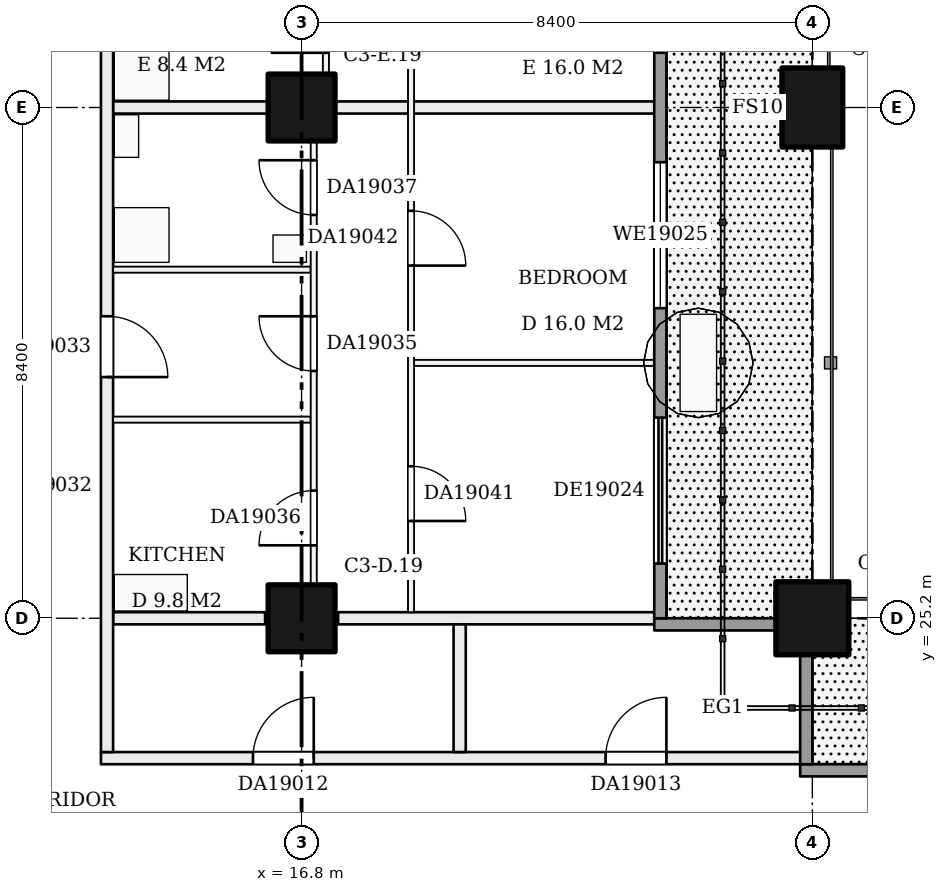
"""IFC4 building model, lengths in metres.
Left out: names, types, materials, properties, quantities, classifications, styles, units other than length and angle.
Written with IfcOpenShell. Run it as: python <this file> out.ifc"""

import sys

from ifc_helpers import new_model, si_unit, direction, frame, frame_2d, origin, origin_2d, place, context, subcontext, project, spatial, rectangle, extrude, element, fill, save


model = new_model("IFC4")
c1 = context("Model", 3, precision=1e-05, world=origin(), true_north=direction((0.0, 1.0)))
c2 = subcontext(c1, "Body", "Model", "MODEL_VIEW")
j1 = project(units=[si_unit("LENGTHUNIT", "METRE"), si_unit("PLANEANGLEUNIT", "RADIAN")], contexts=[c1])
p1 = place(None, origin())
s1 = spatial("IfcSite", under=j1, at=p1, CompositionType="ELEMENT")
p2 = place(p1, origin())
s2 = spatial("IfcBuilding", under=s1, at=p2, CompositionType="ELEMENT")
p3 = place(p2, frame((0.0, 0.0, 81.2)))
s3 = spatial("IfcBuildingStorey", under=s2, at=p3, CompositionType="ELEMENT", Elevation=81.2)
for number, where, z_axis, x_axis in (
    (1, (16.8, 25.2, 0.0), (0.0, 0.0, 1.0), (1.0, 0.0, 0.0)),
    (2, (16.8, 33.6, 0.0), (0.0, 0.0, 1.0), (1.0, 0.0, 0.0)),
):
    element("IfcColumn", number, at=place(p3, frame(where, z_axis=z_axis, x_axis=x_axis)), inside=s3, PredefinedType="COLUMN", context=c2, shape_type="SweptSolid", body=[
        extrude(rectangle(XDim=1.1, YDim=1.1, at=origin_2d()), origin(), (0.0, 0.0, 1.0), 3.22),
    ])
p4 = place(p3, frame((25.2, 25.2, 0.0), z_axis=(0.0, 0.0, 1.0), x_axis=(1.0, 0.0, 0.0)))
e3 = element("IfcColumn", 3, at=p4, inside=s3, PredefinedType="COLUMN", context=c2, shape_type="SweptSolid", body=[
    extrude(rectangle(XDim=1.2, YDim=1.2, at=origin_2d()), origin(), (0.0, 0.0, 1.0), 3.22),
])
p5 = place(p3, frame((25.2, 33.6, 0.0), z_axis=(0.0, 0.0, 1.0), x_axis=(0.0, 1.0, 0.0)))
e4 = element("IfcColumn", 4, at=p5, inside=s3, PredefinedType="COLUMN", context=c2, shape_type="SweptSolid", body=[
    extrude(rectangle(XDim=1.3, YDim=1.0, at=origin_2d()), origin(), (0.0, 0.0, 1.0), 3.22),
])
p6 = place(p3, frame((13.5, 22.9, 0.0), z_axis=(0.0, 0.0, 1.0), x_axis=(1.0, 0.0, 0.0)))
e5 = element("IfcWall", 5, at=p6, inside=s3, PredefinedType="PARTITIONING", context=c2, shape_type="SweptSolid", body=[
    extrude(rectangle(XDim=11.6, YDim=0.2, at=frame_2d((5.8, 0.0))), origin(), (0.0, 0.0, 1.0), 3.22),
])
p7 = place(p6, frame((2.5, 0.0, 0.0)))
e6 = element("IfcOpeningElement", 6, at=p7, cuts=e5, PredefinedType="OPENING", context=c2, shape_type="SweptSolid", body=[
    extrude(rectangle(XDim=1.0, YDim=2.1, at=frame_2d((0.5, 1.05))), frame((0.0, 0.11, 0.0), z_axis=(0.0, -1.0, 0.0), x_axis=(1.0, 0.0, 0.0)), (0.0, 0.0, 1.0), 0.22),
])
p8 = place(p6, frame((8.3, 0.0, 0.0)))
e7 = element("IfcOpeningElement", 7, at=p8, cuts=e5, PredefinedType="OPENING", context=c2, shape_type="SweptSolid", body=[
    extrude(rectangle(XDim=1.0, YDim=2.1, at=frame_2d((0.5, 1.05))), frame((0.0, 0.11, 0.0), z_axis=(0.0, -1.0, 0.0), x_axis=(1.0, 0.0, 0.0)), (0.0, 0.0, 1.0), 0.22),
])
p9 = place(p3, frame((13.7, 25.2, 0.0), z_axis=(0.0, 0.0, 1.0), x_axis=(1.0, 0.0, 0.0)))
e8 = element("IfcWall", 8, at=p9, inside=s3, PredefinedType="PARTITIONING", context=c2, shape_type="SweptSolid", body=[
    extrude(rectangle(XDim=2.5, YDim=0.2, at=frame_2d((1.25, 0.0))), origin(), (0.0, 0.0, 1.0), 3.22),
])
p10 = place(p3, frame((17.4, 25.2, 0.0), z_axis=(0.0, 0.0, 1.0), x_axis=(1.0, 0.0, 0.0)))
e9 = element("IfcWall", 9, at=p10, inside=s3, PredefinedType="PARTITIONING", context=c2, shape_type="SweptSolid", body=[
    extrude(rectangle(XDim=5.3, YDim=0.2, at=frame_2d((2.65, 0.0))), origin(), (0.0, 0.0, 1.0), 3.22),
])
p11 = place(p3, frame((13.7, 28.467, 0.0), z_axis=(0.0, 0.0, 1.0), x_axis=(1.0, 0.0, 0.0)))
e10 = element("IfcWall", 10, at=p11, inside=s3, PredefinedType="PARTITIONING", context=c2, shape_type="SweptSolid", body=[
    extrude(rectangle(XDim=3.25, YDim=0.1, at=frame_2d((1.625, 0.0))), origin(), (0.0, 0.0, 1.0), 3.22),
])
p12 = place(p3, frame((18.65, 29.4, 0.0), z_axis=(0.0, 0.0, 1.0), x_axis=(1.0, 0.0, 0.0)))
e11 = element("IfcWall", 11, at=p12, inside=s3, PredefinedType="PARTITIONING", context=c2, shape_type="SweptSolid", body=[
    extrude(rectangle(XDim=4.05, YDim=0.1, at=frame_2d((2.025, 0.0))), origin(), (0.0, 0.0, 1.0), 3.22),
])
p13 = place(p3, frame((13.7, 30.933, 0.0), z_axis=(0.0, 0.0, 1.0), x_axis=(1.0, 0.0, 0.0)))
e12 = element("IfcWall", 12, at=p13, inside=s3, PredefinedType="PARTITIONING", context=c2, shape_type="SweptSolid", body=[
    extrude(rectangle(XDim=3.25, YDim=0.1, at=frame_2d((1.625, 0.0))), origin(), (0.0, 0.0, 1.0), 3.22),
])
p14 = place(p3, frame((13.7, 33.6, 0.0), z_axis=(0.0, 0.0, 1.0), x_axis=(1.0, 0.0, 0.0)))
e13 = element("IfcWall", 13, at=p14, inside=s3, PredefinedType="PARTITIONING", context=c2, shape_type="SweptSolid", body=[
    extrude(rectangle(XDim=9.0, YDim=0.2, at=frame_2d((4.5, 0.0))), origin(), (0.0, 0.0, 1.0), 3.22),
])
p15 = place(p3, frame((13.6, 23.0, 0.0), z_axis=(0.0, 0.0, 1.0), x_axis=(0.0, 1.0, 0.0)))
e14 = element("IfcWall", 14, at=p15, inside=s3, PredefinedType="PARTITIONING", context=c2, shape_type="SweptSolid", body=[
    extrude(rectangle(XDim=19.0, YDim=0.2, at=frame_2d((9.5, 0.0))), origin(), (0.0, 0.0, 1.0), 3.22),
])
p16 = place(p15, frame((6.167, 0.0, 0.0)))
e15 = element("IfcOpeningElement", 15, at=p16, cuts=e14, PredefinedType="OPENING", context=c2, shape_type="SweptSolid", body=[
    extrude(rectangle(XDim=1.0, YDim=2.1, at=frame_2d((0.5, 1.05))), frame((0.0, 0.11, 0.0), z_axis=(0.0, -1.0, 0.0), x_axis=(1.0, 0.0, 0.0)), (0.0, 0.0, 1.0), 0.22),
])
p17 = place(p15, frame((17.233, 0.0, 0.0)))
e16 = element("IfcOpeningElement", 16, at=p17, cuts=e14, PredefinedType="OPENING", context=c2, shape_type="SweptSolid", body=[
    extrude(rectangle(XDim=1.0, YDim=2.1, at=frame_2d((0.5, 1.05))), frame((0.0, 0.11, 0.0), z_axis=(0.0, -1.0, 0.0), x_axis=(1.0, 0.0, 0.0)), (0.0, 0.0, 1.0), 0.22),
])
p18 = place(p3, frame((17.0, 25.3, 0.0), z_axis=(0.0, 0.0, 1.0), x_axis=(0.0, 1.0, 0.0)))
e17 = element("IfcWall", 17, at=p18, inside=s3, PredefinedType="PARTITIONING", context=c2, shape_type="SweptSolid", body=[
    extrude(rectangle(XDim=8.2, YDim=0.1, at=frame_2d((4.1, 0.0))), origin(), (0.0, 0.0, 1.0), 3.22),
])
p19 = place(p18, frame((3.967, 0.0, 0.0)))
e18 = element("IfcOpeningElement", 18, at=p19, cuts=e17, PredefinedType="OPENING", context=c2, shape_type="SweptSolid", body=[
    extrude(rectangle(XDim=0.9, YDim=2.1, at=frame_2d((0.45, 1.05))), frame((0.0, 0.06, 0.0), z_axis=(0.0, -1.0, 0.0), x_axis=(1.0, 0.0, 0.0)), (0.0, 0.0, 1.0), 0.12),
])
p20 = place(p18, frame((1.1, 0.0, 0.0)))
e19 = element("IfcOpeningElement", 19, at=p20, cuts=e17, PredefinedType="OPENING", context=c2, shape_type="SweptSolid", body=[
    extrude(rectangle(XDim=0.9, YDim=2.1, at=frame_2d((0.45, 1.05))), frame((0.0, 0.06, 0.0), z_axis=(0.0, -1.0, 0.0), x_axis=(1.0, 0.0, 0.0)), (0.0, 0.0, 1.0), 0.12),
])
p21 = place(p18, frame((6.533, 0.0, 0.0)))
e20 = element("IfcOpeningElement", 20, at=p21, cuts=e17, PredefinedType="OPENING", context=c2, shape_type="SweptSolid", body=[
    extrude(rectangle(XDim=0.9, YDim=2.1, at=frame_2d((0.45, 1.05))), frame((0.0, 0.06, 0.0), z_axis=(0.0, -1.0, 0.0), x_axis=(1.0, 0.0, 0.0)), (0.0, 0.0, 1.0), 0.12),
])
p22 = place(p3, frame((17.2, 33.7, 0.0), z_axis=(0.0, 0.0, 1.0), x_axis=(0.0, 1.0, 0.0)))
e21 = element("IfcWall", 21, at=p22, inside=s3, PredefinedType="PARTITIONING", context=c2, shape_type="SweptSolid", body=[
    extrude(rectangle(XDim=8.3, YDim=0.1, at=frame_2d((4.15, 0.0))), origin(), (0.0, 0.0, 1.0), 3.22),
])
p23 = place(p22, frame((6.633, 0.0, 0.0)))
e22 = element("IfcOpeningElement", 22, at=p23, cuts=e21, PredefinedType="OPENING", context=c2, shape_type="SweptSolid", body=[
    extrude(rectangle(XDim=0.9, YDim=2.1, at=frame_2d((0.45, 1.05))), frame((0.0, 0.06, 0.0), z_axis=(0.0, -1.0, 0.0), x_axis=(1.0, 0.0, 0.0)), (0.0, 0.0, 1.0), 0.12),
])
p24 = place(p22, frame((0.8, 0.0, 0.0)))
e23 = element("IfcOpeningElement", 23, at=p24, cuts=e21, PredefinedType="OPENING", context=c2, shape_type="SweptSolid", body=[
    extrude(rectangle(XDim=0.9, YDim=2.1, at=frame_2d((0.45, 1.05))), frame((0.0, 0.06, 0.0), z_axis=(0.0, -1.0, 0.0), x_axis=(1.0, 0.0, 0.0)), (0.0, 0.0, 1.0), 0.12),
])
p25 = place(p22, frame((3.767, 0.0, 0.0)))
e24 = element("IfcOpeningElement", 24, at=p25, cuts=e21, PredefinedType="OPENING", context=c2, shape_type="SweptSolid", body=[
    extrude(rectangle(XDim=0.9, YDim=2.1, at=frame_2d((0.45, 1.05))), frame((0.0, 0.06, 0.0), z_axis=(0.0, -1.0, 0.0), x_axis=(1.0, 0.0, 0.0)), (0.0, 0.0, 1.0), 0.12),
])
p26 = place(p3, frame((18.6, 25.3, 0.0), z_axis=(0.0, 0.0, 1.0), x_axis=(0.0, 1.0, 0.0)))
e25 = element("IfcWall", 25, at=p26, inside=s3, PredefinedType="PARTITIONING", context=c2, shape_type="SweptSolid", body=[
    extrude(rectangle(XDim=16.7, YDim=0.1, at=frame_2d((8.35, 0.0))), origin(), (0.0, 0.0, 1.0), 3.22),
])
p27 = place(p26, frame((1.5, 0.0, 0.0)))
e26 = element("IfcOpeningElement", 26, at=p27, cuts=e25, PredefinedType="OPENING", context=c2, shape_type="SweptSolid", body=[
    extrude(rectangle(XDim=0.9, YDim=2.1, at=frame_2d((0.45, 1.05))), frame((0.0, 0.06, 0.0), z_axis=(0.0, -1.0, 0.0), x_axis=(1.0, 0.0, 0.0)), (0.0, 0.0, 1.0), 0.12),
])
p28 = place(p26, frame((5.7, 0.0, 0.0)))
e27 = element("IfcOpeningElement", 27, at=p28, cuts=e25, PredefinedType="OPENING", context=c2, shape_type="SweptSolid", body=[
    extrude(rectangle(XDim=0.9, YDim=2.1, at=frame_2d((0.45, 1.05))), frame((0.0, 0.06, 0.0), z_axis=(0.0, -1.0, 0.0), x_axis=(1.0, 0.0, 0.0)), (0.0, 0.0, 1.0), 0.12),
])
p29 = place(p26, frame((9.9, 0.0, 0.0)))
e28 = element("IfcOpeningElement", 28, at=p29, cuts=e25, PredefinedType="OPENING", context=c2, shape_type="SweptSolid", body=[
    extrude(rectangle(XDim=0.9, YDim=2.1, at=frame_2d((0.45, 1.05))), frame((0.0, 0.06, 0.0), z_axis=(0.0, -1.0, 0.0), x_axis=(1.0, 0.0, 0.0)), (0.0, 0.0, 1.0), 0.12),
])
p30 = place(p26, frame((14.1, 0.0, 0.0)))
e29 = element("IfcOpeningElement", 29, at=p30, cuts=e25, PredefinedType="OPENING", context=c2, shape_type="SweptSolid", body=[
    extrude(rectangle(XDim=0.9, YDim=2.1, at=frame_2d((0.45, 1.05))), frame((0.0, 0.06, 0.0), z_axis=(0.0, -1.0, 0.0), x_axis=(1.0, 0.0, 0.0)), (0.0, 0.0, 1.0), 0.12),
])
p31 = place(p3, frame((19.4, 23.0, 0.0), z_axis=(0.0, 0.0, 1.0), x_axis=(0.0, 1.0, 0.0)))
e30 = element("IfcWall", 30, at=p31, inside=s3, PredefinedType="PARTITIONING", context=c2, shape_type="SweptSolid", body=[
    extrude(rectangle(XDim=2.1, YDim=0.2, at=frame_2d((1.05, 0.0))), origin(), (0.0, 0.0, 1.0), 3.22),
])
p32 = place(p3, frame((42.0, 22.7, 0.0), z_axis=(0.0, 0.0, 1.0), x_axis=(-1.0, 0.0, 0.0)))
e31 = element("IfcWall", 31, at=p32, inside=s3, PredefinedType="SOLIDWALL", context=c2, shape_type="SweptSolid", body=[
    extrude(rectangle(XDim=17.0, YDim=0.2, at=frame_2d((8.5, 0.0))), origin(), (0.0, 0.0, 1.0), 3.22),
])
p33 = place(p32, frame((9.6, 0.0, 0.0)))
e32 = element("IfcOpeningElement", 32, at=p33, cuts=e31, PredefinedType="OPENING", context=c2, shape_type="SweptSolid", body=[
    extrude(rectangle(XDim=1.8, YDim=2.4, at=frame_2d((0.9, 1.2))), frame((0.0, 0.11, 0.0), z_axis=(0.0, -1.0, 0.0), x_axis=(1.0, 0.0, 0.0)), (0.0, 0.0, 1.0), 0.22),
])
p34 = place(p3, frame((25.1, 22.8, 0.0), z_axis=(0.0, 0.0, 1.0), x_axis=(0.0, 1.0, 0.0)))
e33 = element("IfcWall", 33, at=p34, inside=s3, PredefinedType="SOLIDWALL", context=c2, shape_type="SweptSolid", body=[
    extrude(rectangle(XDim=1.8, YDim=0.2, at=frame_2d((0.9, 0.0))), origin(), (0.0, 0.0, 1.0), 3.22),
])
p35 = place(p3, frame((24.6, 25.1, 0.0), z_axis=(0.0, 0.0, 1.0), x_axis=(-1.0, 0.0, 0.0)))
e34 = element("IfcWall", 34, at=p35, inside=s3, PredefinedType="SOLIDWALL", context=c2, shape_type="SweptSolid", body=[
    extrude(rectangle(XDim=2.0, YDim=0.2, at=frame_2d((1.0, 0.0))), origin(), (0.0, 0.0, 1.0), 3.22),
])
p36 = place(p3, frame((22.7, 25.2, 0.0), z_axis=(0.0, 0.0, 1.0), x_axis=(0.0, 1.0, 0.0)))
e35 = element("IfcWall", 35, at=p36, inside=s3, PredefinedType="SOLIDWALL", context=c2, shape_type="SweptSolid", body=[
    extrude(rectangle(XDim=16.8, YDim=0.2, at=frame_2d((8.4, 0.0))), origin(), (0.0, 0.0, 1.0), 3.22),
])
p37 = place(p36, frame((0.9, 0.0, 0.0)))
e36 = element("IfcOpeningElement", 36, at=p37, cuts=e35, PredefinedType="OPENING", context=c2, shape_type="SweptSolid", body=[
    extrude(rectangle(XDim=2.4, YDim=2.2, at=frame_2d((1.2, 1.1))), frame((0.0, 0.11, 0.0), z_axis=(0.0, -1.0, 0.0), x_axis=(1.0, 0.0, 0.0)), (0.0, 0.0, 1.0), 0.22),
])
p38 = place(p36, frame((5.1, 0.0, 0.9)))
e37 = element("IfcOpeningElement", 37, at=p38, cuts=e35, PredefinedType="OPENING", context=c2, shape_type="SweptSolid", body=[
    extrude(rectangle(XDim=2.4, YDim=1.5, at=frame_2d((1.2, 0.75))), frame((0.0, 0.11, 0.0), z_axis=(0.0, -1.0, 0.0), x_axis=(1.0, 0.0, 0.0)), (0.0, 0.0, 1.0), 0.22),
])
p39 = place(p36, frame((9.3, 0.0, 0.9)))
e38 = element("IfcOpeningElement", 38, at=p39, cuts=e35, PredefinedType="OPENING", context=c2, shape_type="SweptSolid", body=[
    extrude(rectangle(XDim=2.4, YDim=1.5, at=frame_2d((1.2, 0.75))), frame((0.0, 0.11, 0.0), z_axis=(0.0, -1.0, 0.0), x_axis=(1.0, 0.0, 0.0)), (0.0, 0.0, 1.0), 0.22),
])
p40 = place(p36, frame((13.5, 0.0, 0.0)))
e39 = element("IfcOpeningElement", 39, at=p40, cuts=e35, PredefinedType="OPENING", context=c2, shape_type="SweptSolid", body=[
    extrude(rectangle(XDim=2.4, YDim=2.2, at=frame_2d((1.2, 1.1))), frame((0.0, 0.11, 0.0), z_axis=(0.0, -1.0, 0.0), x_axis=(1.0, 0.0, 0.0)), (0.0, 0.0, 1.0), 0.22),
])
p41 = place(p7, origin())
e40 = element("IfcDoor", 40, at=p41, inside=s3, OperationType="SINGLE_SWING_RIGHT", PredefinedType="DOOR", context=c2, shape_type="SweptSolid", body=[
    extrude(rectangle(XDim=1.0, YDim=2.1, at=frame_2d((0.5, 1.05))), frame((0.0, 0.025, 0.0), z_axis=(0.0, -1.0, 0.0), x_axis=(1.0, 0.0, 0.0)), (0.0, 0.0, 1.0), 0.05),
])
fill(e6, e40)
p42 = place(p8, origin())
e41 = element("IfcDoor", 41, at=p42, inside=s3, OperationType="SINGLE_SWING_RIGHT", PredefinedType="DOOR", context=c2, shape_type="SweptSolid", body=[
    extrude(rectangle(XDim=1.0, YDim=2.1, at=frame_2d((0.5, 1.05))), frame((0.0, 0.025, 0.0), z_axis=(0.0, -1.0, 0.0), x_axis=(1.0, 0.0, 0.0)), (0.0, 0.0, 1.0), 0.05),
])
fill(e7, e41)
p43 = place(p16, frame((1.0, 0.0, 0.0), z_axis=(0.0, 0.0, 1.0), x_axis=(-1.0, 0.0, 0.0)))
e42 = element("IfcDoor", 42, at=p43, inside=s3, OperationType="SINGLE_SWING_RIGHT", PredefinedType="DOOR", context=c2, shape_type="SweptSolid", body=[
    extrude(rectangle(XDim=1.0, YDim=2.1, at=frame_2d((0.5, 1.05))), frame((0.0, 0.025, 0.0), z_axis=(0.0, -1.0, 0.0), x_axis=(1.0, 0.0, 0.0)), (0.0, 0.0, 1.0), 0.05),
])
fill(e15, e42)
p44 = place(p19, origin())
e43 = element("IfcDoor", 43, at=p44, inside=s3, OperationType="SINGLE_SWING_RIGHT", PredefinedType="DOOR", context=c2, shape_type="SweptSolid", body=[
    extrude(rectangle(XDim=0.9, YDim=2.1, at=frame_2d((0.45, 1.05))), frame((0.0, 0.025, 0.0), z_axis=(0.0, -1.0, 0.0), x_axis=(1.0, 0.0, 0.0)), (0.0, 0.0, 1.0), 0.05),
])
fill(e18, e43)
p45 = place(p20, origin())
e44 = element("IfcDoor", 44, at=p45, inside=s3, OperationType="SINGLE_SWING_LEFT", PredefinedType="DOOR", context=c2, shape_type="SweptSolid", body=[
    extrude(rectangle(XDim=0.9, YDim=2.1, at=frame_2d((0.45, 1.05))), frame((0.0, 0.025, 0.0), z_axis=(0.0, -1.0, 0.0), x_axis=(1.0, 0.0, 0.0)), (0.0, 0.0, 1.0), 0.05),
])
fill(e19, e44)
p46 = place(p21, origin())
e45 = element("IfcDoor", 45, at=p46, inside=s3, OperationType="SINGLE_SWING_RIGHT", PredefinedType="DOOR", context=c2, shape_type="SweptSolid", body=[
    extrude(rectangle(XDim=0.9, YDim=2.1, at=frame_2d((0.45, 1.05))), frame((0.0, 0.025, 0.0), z_axis=(0.0, -1.0, 0.0), x_axis=(1.0, 0.0, 0.0)), (0.0, 0.0, 1.0), 0.05),
])
fill(e20, e45)
p47 = place(p27, frame((0.9, 0.0, 0.0), z_axis=(0.0, 0.0, 1.0), x_axis=(-1.0, 0.0, 0.0)))
e46 = element("IfcDoor", 46, at=p47, inside=s3, OperationType="SINGLE_SWING_RIGHT", PredefinedType="DOOR", context=c2, shape_type="SweptSolid", body=[
    extrude(rectangle(XDim=0.9, YDim=2.1, at=frame_2d((0.45, 1.05))), frame((0.0, 0.025, 0.0), z_axis=(0.0, -1.0, 0.0), x_axis=(1.0, 0.0, 0.0)), (0.0, 0.0, 1.0), 0.05),
])
fill(e26, e46)
p48 = place(p28, frame((0.9, 0.0, 0.0), z_axis=(0.0, 0.0, 1.0), x_axis=(-1.0, 0.0, 0.0)))
e47 = element("IfcDoor", 47, at=p48, inside=s3, OperationType="SINGLE_SWING_RIGHT", PredefinedType="DOOR", context=c2, shape_type="SweptSolid", body=[
    extrude(rectangle(XDim=0.9, YDim=2.1, at=frame_2d((0.45, 1.05))), frame((0.0, 0.025, 0.0), z_axis=(0.0, -1.0, 0.0), x_axis=(1.0, 0.0, 0.0)), (0.0, 0.0, 1.0), 0.05),
])
fill(e27, e47)
p49 = place(p37, origin())
e48 = element("IfcDoor", 48, at=p49, inside=s3, OperationType="DOUBLE_DOOR_SLIDING", PredefinedType="DOOR", context=c2, shape_type="SweptSolid", body=[
    extrude(rectangle(XDim=2.4, YDim=2.2, at=frame_2d((1.2, 1.1))), frame((0.0, 0.025, 0.0), z_axis=(0.0, -1.0, 0.0), x_axis=(1.0, 0.0, 0.0)), (0.0, 0.0, 1.0), 0.05),
])
fill(e36, e48)
p50 = place(p38, origin())
e49 = element("IfcWindow", 49, at=p50, inside=s3, PartitioningType="SINGLE_PANEL", PredefinedType="WINDOW", context=c2, shape_type="SweptSolid", body=[
    extrude(rectangle(XDim=2.4, YDim=1.5, at=frame_2d((1.2, 0.75))), frame((0.0, 0.03, 0.0), z_axis=(0.0, -1.0, 0.0), x_axis=(1.0, 0.0, 0.0)), (0.0, 0.0, 1.0), 0.06),
])
fill(e37, e49)
save(model, sys.argv[1])
